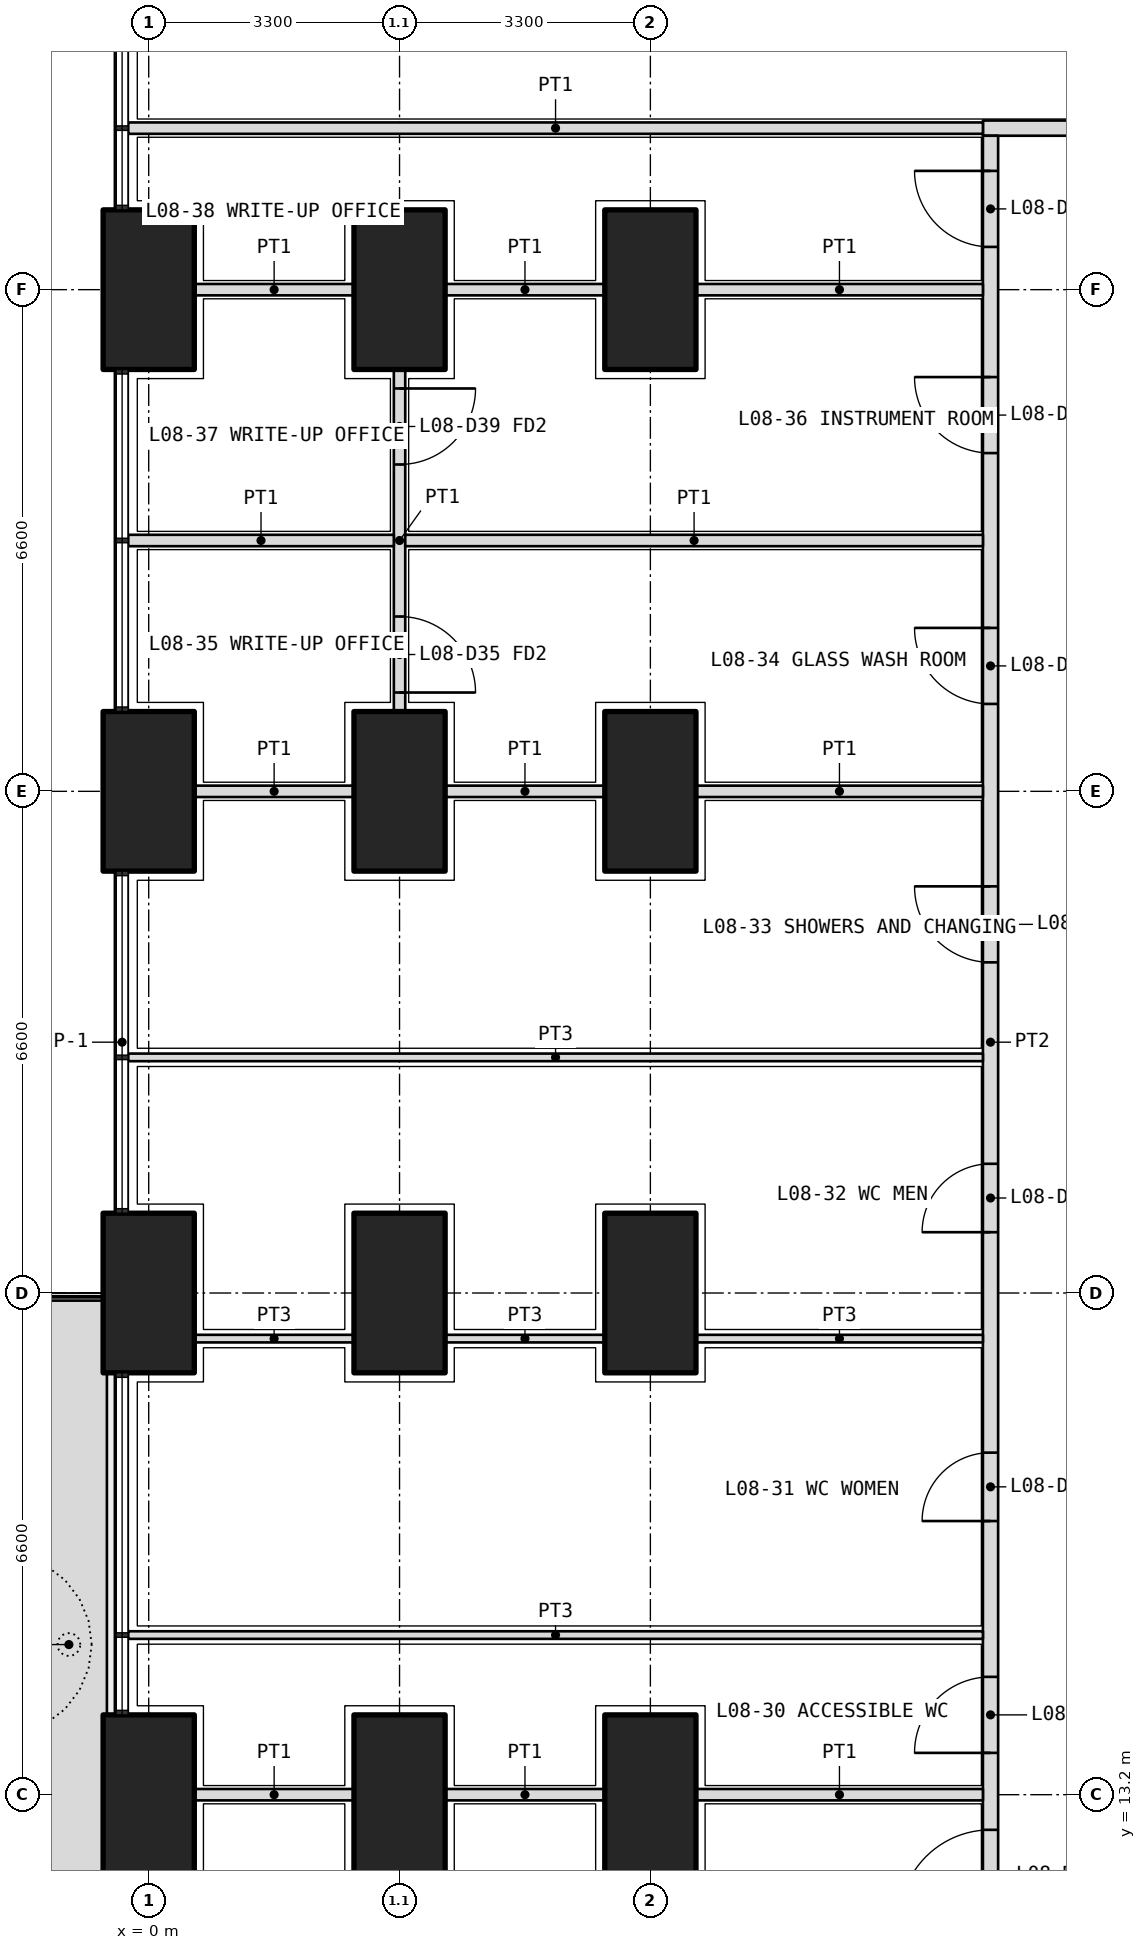
"""IFC4 building model, lengths in metres.
Left out: names, types, materials, properties, quantities, classifications, styles, units other than length and angle.
Written with IfcOpenShell. Run it as: python <this file> out.ifc"""

import sys

from ifc_helpers import new_model, si_unit, direction, frame, frame_2d, origin, origin_2d, place, context, subcontext, project, spatial, polyline, rectangle, outline, extrude, element, fill, save


model = new_model("IFC4")
c1 = context("Model", 3, precision=1e-05, world=origin(), true_north=direction((0.0, 1.0)))
c2 = subcontext(c1, "Body", "Model", "MODEL_VIEW")
j1 = project(units=[si_unit("LENGTHUNIT", "METRE"), si_unit("PLANEANGLEUNIT", "RADIAN")], contexts=[c1])
p1 = place(None, origin())
s1 = spatial("IfcSite", under=j1, at=p1, CompositionType="ELEMENT")
p2 = place(p1, origin())
s2 = spatial("IfcBuilding", under=s1, at=p2, CompositionType="ELEMENT")
p3 = place(p2, frame((0.0, 0.0, 38.1)))
s3 = spatial("IfcBuildingStorey", under=s2, at=p3, CompositionType="ELEMENT", Elevation=38.1)
for number, where, z_axis, x_axis in (
    (1, (0.0, 13.2, 0.0), (0.0, 0.0, 1.0), (0.0, 1.0, 0.0)),
    (2, (0.0, 19.8, 0.0), (0.0, 0.0, 1.0), (0.0, 1.0, 0.0)),
    (3, (0.0, 26.4, 0.0), (0.0, 0.0, 1.0), (0.0, 1.0, 0.0)),
    (4, (0.0, 33.0, 0.0), (0.0, 0.0, 1.0), (0.0, 1.0, 0.0)),
    (5, (3.3, 13.2, 0.0), (0.0, 0.0, 1.0), (0.0, 1.0, 0.0)),
    (6, (3.3, 19.8, 0.0), (0.0, 0.0, 1.0), (0.0, 1.0, 0.0)),
    (7, (3.3, 26.4, 0.0), (0.0, 0.0, 1.0), (0.0, 1.0, 0.0)),
    (8, (3.3, 33.0, 0.0), (0.0, 0.0, 1.0), (0.0, 1.0, 0.0)),
    (9, (6.6, 13.2, 0.0), (0.0, 0.0, 1.0), (0.0, 1.0, 0.0)),
    (10, (6.6, 19.8, 0.0), (0.0, 0.0, 1.0), (0.0, 1.0, 0.0)),
    (11, (6.6, 26.4, 0.0), (0.0, 0.0, 1.0), (0.0, 1.0, 0.0)),
    (12, (6.6, 33.0, 0.0), (0.0, 0.0, 1.0), (0.0, 1.0, 0.0)),
):
    element("IfcColumn", number, at=place(p3, frame(where, z_axis=z_axis, x_axis=x_axis)), inside=s3, PredefinedType="COLUMN", context=c2, shape_type="SweptSolid", body=[
        extrude(rectangle(XDim=2.1, YDim=1.2, at=origin_2d()), origin(), (0.0, 0.0, 1.0), 4.2),
    ])
p4 = place(p3, origin())
e13 = element("IfcWall", 13, at=p4, inside=s3, PredefinedType="USERDEFINED", context=c2, shape_type="SweptSolid", body=[
    extrude(outline(polyline([(-1.55, 10.65), (-0.55, 10.65), (-0.55, 19.7), (-1.55, 19.7), (-1.55, 10.65)]), holes=[polyline([(-1.4, 10.8), (-0.7, 10.8), (-0.7, 19.55), (-1.4, 19.55), (-1.4, 10.8)])]), origin(), (0.0, 0.0, 1.0), 1.05),
])
p5 = place(p3, frame((10.975, 35.125, 0.0), z_axis=(0.0, 0.0, 1.0), x_axis=(1.0, 0.0, 0.0)))
e14 = element("IfcWall", 14, at=p5, inside=s3, PredefinedType="PARTITIONING", context=c2, shape_type="SweptSolid", body=[
    extrude(rectangle(XDim=18.725, YDim=0.2, at=frame_2d((9.362, 0.0))), origin(), (0.0, 0.0, 1.0), 2.85),
])
p6 = place(p5, frame((5.512, 0.0, 0.0)))
e15 = element("IfcOpeningElement", 15, at=p6, cuts=e14, PredefinedType="OPENING", context=c2, shape_type="SweptSolid", body=[
    extrude(rectangle(XDim=1.2, YDim=2.1, at=frame_2d((0.6, 1.05))), frame((0.0, 0.11, 0.0), z_axis=(0.0, -1.0, 0.0), x_axis=(1.0, 0.0, 0.0)), (0.0, 0.0, 1.0), 0.22),
])
p7 = place(p5, frame((14.925, 0.0, 0.0)))
e16 = element("IfcOpeningElement", 16, at=p7, cuts=e14, PredefinedType="OPENING", context=c2, shape_type="SweptSolid", body=[
    extrude(rectangle(XDim=1.0, YDim=2.1, at=frame_2d((0.5, 1.05))), frame((0.0, 0.11, 0.0), z_axis=(0.0, -1.0, 0.0), x_axis=(1.0, 0.0, 0.0)), (0.0, 0.0, 1.0), 0.22),
])
p8 = place(p3, frame((11.075, 11.175, 0.0), z_axis=(0.0, 0.0, 1.0), x_axis=(0.0, 1.0, 0.0)))
e17 = element("IfcWall", 17, at=p8, inside=s3, PredefinedType="PARTITIONING", context=c2, shape_type="SweptSolid", body=[
    extrude(rectangle(XDim=23.85, YDim=0.2, at=frame_2d((11.925, 0.0))), origin(), (0.0, 0.0, 1.0), 2.85),
])
p9 = place(p8, frame((0.363, 0.0, 0.0)))
e18 = element("IfcOpeningElement", 18, at=p9, cuts=e17, PredefinedType="OPENING", context=c2, shape_type="SweptSolid", body=[
    extrude(rectangle(XDim=1.2, YDim=2.1, at=frame_2d((0.6, 1.05))), frame((0.0, 0.11, 0.0), z_axis=(0.0, -1.0, 0.0), x_axis=(1.0, 0.0, 0.0)), (0.0, 0.0, 1.0), 0.22),
])
p10 = place(p8, frame((2.575, 0.0, 0.0)))
e19 = element("IfcOpeningElement", 19, at=p10, cuts=e17, PredefinedType="OPENING", context=c2, shape_type="SweptSolid", body=[
    extrude(rectangle(XDim=1.0, YDim=2.1, at=frame_2d((0.5, 1.05))), frame((0.0, 0.11, 0.0), z_axis=(0.0, -1.0, 0.0), x_axis=(1.0, 0.0, 0.0)), (0.0, 0.0, 1.0), 0.22),
])
p11 = place(p8, frame((5.625, 0.0, 0.0)))
e20 = element("IfcOpeningElement", 20, at=p11, cuts=e17, PredefinedType="OPENING", context=c2, shape_type="SweptSolid", body=[
    extrude(rectangle(XDim=0.9, YDim=2.1, at=frame_2d((0.45, 1.05))), frame((0.0, 0.11, 0.0), z_axis=(0.0, -1.0, 0.0), x_axis=(1.0, 0.0, 0.0)), (0.0, 0.0, 1.0), 0.22),
])
p12 = place(p8, frame((9.425, 0.0, 0.0)))
e21 = element("IfcOpeningElement", 21, at=p12, cuts=e17, PredefinedType="OPENING", context=c2, shape_type="SweptSolid", body=[
    extrude(rectangle(XDim=0.9, YDim=2.1, at=frame_2d((0.45, 1.05))), frame((0.0, 0.11, 0.0), z_axis=(0.0, -1.0, 0.0), x_axis=(1.0, 0.0, 0.0)), (0.0, 0.0, 1.0), 0.22),
])
p13 = place(p8, frame((12.975, 0.0, 0.0)))
e22 = element("IfcOpeningElement", 22, at=p13, cuts=e17, PredefinedType="OPENING", context=c2, shape_type="SweptSolid", body=[
    extrude(rectangle(XDim=1.0, YDim=2.1, at=frame_2d((0.5, 1.05))), frame((0.0, 0.11, 0.0), z_axis=(0.0, -1.0, 0.0), x_axis=(1.0, 0.0, 0.0)), (0.0, 0.0, 1.0), 0.22),
])
p14 = place(p8, frame((16.375, 0.0, 0.0)))
e23 = element("IfcOpeningElement", 23, at=p14, cuts=e17, PredefinedType="OPENING", context=c2, shape_type="SweptSolid", body=[
    extrude(rectangle(XDim=1.0, YDim=2.1, at=frame_2d((0.5, 1.05))), frame((0.0, 0.11, 0.0), z_axis=(0.0, -1.0, 0.0), x_axis=(1.0, 0.0, 0.0)), (0.0, 0.0, 1.0), 0.22),
])
p15 = place(p8, frame((19.675, 0.0, 0.0)))
e24 = element("IfcOpeningElement", 24, at=p15, cuts=e17, PredefinedType="OPENING", context=c2, shape_type="SweptSolid", body=[
    extrude(rectangle(XDim=1.0, YDim=2.1, at=frame_2d((0.5, 1.05))), frame((0.0, 0.11, 0.0), z_axis=(0.0, -1.0, 0.0), x_axis=(1.0, 0.0, 0.0)), (0.0, 0.0, 1.0), 0.22),
])
p16 = place(p8, frame((22.387, 0.0, 0.0)))
e25 = element("IfcOpeningElement", 25, at=p16, cuts=e17, PredefinedType="OPENING", context=c2, shape_type="SweptSolid", body=[
    extrude(rectangle(XDim=1.0, YDim=2.1, at=frame_2d((0.5, 1.05))), frame((0.0, 0.11, 0.0), z_axis=(0.0, -1.0, 0.0), x_axis=(1.0, 0.0, 0.0)), (0.0, 0.0, 1.0), 0.22),
])
p17 = place(p3, frame((-0.27, 35.125, 0.0), z_axis=(0.0, 0.0, 1.0), x_axis=(1.0, 0.0, 0.0)))
e26 = element("IfcWall", 26, at=p17, inside=s3, PredefinedType="PARTITIONING", context=c2, shape_type="SweptSolid", body=[
    extrude(rectangle(XDim=11.245, YDim=0.15, at=frame_2d((5.623, 0.0))), origin(), (0.0, 0.0, 1.0), 2.7),
])
p18 = place(p3, frame((3.3, 31.95, 0.0), z_axis=(0.0, 0.0, 1.0), x_axis=(0.0, -1.0, 0.0)))
e27 = element("IfcWall", 27, at=p18, inside=s3, PredefinedType="PARTITIONING", context=c2, shape_type="SweptSolid", body=[
    extrude(rectangle(XDim=4.5, YDim=0.15, at=frame_2d((2.25, 0.0))), origin(), (0.0, 0.0, 1.0), 3.9),
])
p19 = place(p18, frame((3.25, 0.0, 0.0)))
e28 = element("IfcOpeningElement", 28, at=p19, cuts=e27, PredefinedType="OPENING", context=c2, shape_type="SweptSolid", body=[
    extrude(rectangle(XDim=1.0, YDim=2.1, at=frame_2d((0.5, 1.05))), frame((0.0, 0.085, 0.0), z_axis=(0.0, -1.0, 0.0), x_axis=(1.0, 0.0, 0.0)), (0.0, 0.0, 1.0), 0.17),
])
p20 = place(p18, frame((0.25, 0.0, 0.0)))
e29 = element("IfcOpeningElement", 29, at=p20, cuts=e27, PredefinedType="OPENING", context=c2, shape_type="SweptSolid", body=[
    extrude(rectangle(XDim=1.0, YDim=2.1, at=frame_2d((0.5, 1.05))), frame((0.0, 0.085, 0.0), z_axis=(0.0, -1.0, 0.0), x_axis=(1.0, 0.0, 0.0)), (0.0, 0.0, 1.0), 0.17),
])
p21 = place(p3, frame((-0.27, 15.3, 0.0), z_axis=(0.0, 0.0, 1.0), x_axis=(1.0, 0.0, 0.0)))
e30 = element("IfcWall", 30, at=p21, inside=s3, PredefinedType="PARTITIONING", context=c2, shape_type="SweptSolid", body=[
    extrude(rectangle(XDim=11.245, YDim=0.1, at=frame_2d((5.623, 0.0))), origin(), (0.0, 0.0, 1.0), 2.7),
])
p22 = place(p3, frame((0.6, 19.2, 0.0), z_axis=(0.0, 0.0, 1.0), x_axis=(1.0, 0.0, 0.0)))
e31 = element("IfcWall", 31, at=p22, inside=s3, PredefinedType="PARTITIONING", context=c2, shape_type="SweptSolid", body=[
    extrude(rectangle(XDim=2.1, YDim=0.1, at=frame_2d((1.05, 0.0))), origin(), (0.0, 0.0, 1.0), 2.85),
])
p23 = place(p3, frame((3.9, 19.2, 0.0), z_axis=(0.0, 0.0, 1.0), x_axis=(1.0, 0.0, 0.0)))
e32 = element("IfcWall", 32, at=p23, inside=s3, PredefinedType="PARTITIONING", context=c2, shape_type="SweptSolid", body=[
    extrude(rectangle(XDim=2.1, YDim=0.1, at=frame_2d((1.05, 0.0))), origin(), (0.0, 0.0, 1.0), 2.85),
])
p24 = place(p3, frame((7.2, 19.2, 0.0), z_axis=(0.0, 0.0, 1.0), x_axis=(1.0, 0.0, 0.0)))
e33 = element("IfcWall", 33, at=p24, inside=s3, PredefinedType="PARTITIONING", context=c2, shape_type="SweptSolid", body=[
    extrude(rectangle(XDim=3.775, YDim=0.1, at=frame_2d((1.888, 0.0))), origin(), (0.0, 0.0, 1.0), 2.85),
])
p25 = place(p3, frame((-0.27, 22.9, 0.0), z_axis=(0.0, 0.0, 1.0), x_axis=(1.0, 0.0, 0.0)))
e34 = element("IfcWall", 34, at=p25, inside=s3, PredefinedType="PARTITIONING", context=c2, shape_type="SweptSolid", body=[
    extrude(rectangle(XDim=11.245, YDim=0.1, at=frame_2d((5.623, 0.0))), origin(), (0.0, 0.0, 1.0), 2.7),
])
p26 = place(p3, frame((0.6, 13.2, 0.0), z_axis=(0.0, 0.0, 1.0), x_axis=(1.0, 0.0, 0.0)))
e35 = element("IfcWall", 35, at=p26, inside=s3, PredefinedType="PARTITIONING", context=c2, shape_type="SweptSolid", body=[
    extrude(rectangle(XDim=2.1, YDim=0.15, at=frame_2d((1.05, 0.0))), origin(), (0.0, 0.0, 1.0), 2.85),
])
p27 = place(p3, frame((3.9, 13.2, 0.0), z_axis=(0.0, 0.0, 1.0), x_axis=(1.0, 0.0, 0.0)))
e36 = element("IfcWall", 36, at=p27, inside=s3, PredefinedType="PARTITIONING", context=c2, shape_type="SweptSolid", body=[
    extrude(rectangle(XDim=2.1, YDim=0.15, at=frame_2d((1.05, 0.0))), origin(), (0.0, 0.0, 1.0), 2.85),
])
p28 = place(p3, frame((7.2, 13.2, 0.0), z_axis=(0.0, 0.0, 1.0), x_axis=(1.0, 0.0, 0.0)))
e37 = element("IfcWall", 37, at=p28, inside=s3, PredefinedType="PARTITIONING", context=c2, shape_type="SweptSolid", body=[
    extrude(rectangle(XDim=3.775, YDim=0.15, at=frame_2d((1.888, 0.0))), origin(), (0.0, 0.0, 1.0), 2.85),
])
p29 = place(p3, frame((0.6, 26.4, 0.0), z_axis=(0.0, 0.0, 1.0), x_axis=(1.0, 0.0, 0.0)))
e38 = element("IfcWall", 38, at=p29, inside=s3, PredefinedType="PARTITIONING", context=c2, shape_type="SweptSolid", body=[
    extrude(rectangle(XDim=2.1, YDim=0.15, at=frame_2d((1.05, 0.0))), origin(), (0.0, 0.0, 1.0), 2.85),
])
p30 = place(p3, frame((3.9, 26.4, 0.0), z_axis=(0.0, 0.0, 1.0), x_axis=(1.0, 0.0, 0.0)))
e39 = element("IfcWall", 39, at=p30, inside=s3, PredefinedType="PARTITIONING", context=c2, shape_type="SweptSolid", body=[
    extrude(rectangle(XDim=2.1, YDim=0.15, at=frame_2d((1.05, 0.0))), origin(), (0.0, 0.0, 1.0), 2.85),
])
p31 = place(p3, frame((7.2, 26.4, 0.0), z_axis=(0.0, 0.0, 1.0), x_axis=(1.0, 0.0, 0.0)))
e40 = element("IfcWall", 40, at=p31, inside=s3, PredefinedType="PARTITIONING", context=c2, shape_type="SweptSolid", body=[
    extrude(rectangle(XDim=3.775, YDim=0.15, at=frame_2d((1.888, 0.0))), origin(), (0.0, 0.0, 1.0), 2.85),
])
p32 = place(p3, frame((-0.27, 29.7, 0.0), z_axis=(0.0, 0.0, 1.0), x_axis=(1.0, 0.0, 0.0)))
e41 = element("IfcWall", 41, at=p32, inside=s3, PredefinedType="PARTITIONING", context=c2, shape_type="SweptSolid", body=[
    extrude(rectangle(XDim=3.495, YDim=0.15, at=frame_2d((1.748, 0.0))), origin(), (0.0, 0.0, 1.0), 2.7),
])
p33 = place(p3, frame((3.375, 29.7, 0.0), z_axis=(0.0, 0.0, 1.0), x_axis=(1.0, 0.0, 0.0)))
e42 = element("IfcWall", 42, at=p33, inside=s3, PredefinedType="PARTITIONING", context=c2, shape_type="SweptSolid", body=[
    extrude(rectangle(XDim=7.6, YDim=0.15, at=frame_2d((3.8, 0.0))), origin(), (0.0, 0.0, 1.0), 3.9),
])
p34 = place(p3, frame((0.6, 33.0, 0.0), z_axis=(0.0, 0.0, 1.0), x_axis=(1.0, 0.0, 0.0)))
e43 = element("IfcWall", 43, at=p34, inside=s3, PredefinedType="PARTITIONING", context=c2, shape_type="SweptSolid", body=[
    extrude(rectangle(XDim=2.1, YDim=0.15, at=frame_2d((1.05, 0.0))), origin(), (0.0, 0.0, 1.0), 2.85),
])
p35 = place(p3, frame((3.9, 33.0, 0.0), z_axis=(0.0, 0.0, 1.0), x_axis=(1.0, 0.0, 0.0)))
e44 = element("IfcWall", 44, at=p35, inside=s3, PredefinedType="PARTITIONING", context=c2, shape_type="SweptSolid", body=[
    extrude(rectangle(XDim=2.1, YDim=0.15, at=frame_2d((1.05, 0.0))), origin(), (0.0, 0.0, 1.0), 2.85),
])
p36 = place(p3, frame((7.2, 33.0, 0.0), z_axis=(0.0, 0.0, 1.0), x_axis=(1.0, 0.0, 0.0)))
e45 = element("IfcWall", 45, at=p36, inside=s3, PredefinedType="PARTITIONING", context=c2, shape_type="SweptSolid", body=[
    extrude(rectangle(XDim=3.775, YDim=0.15, at=frame_2d((1.888, 0.0))), origin(), (0.0, 0.0, 1.0), 2.85),
])
p37 = place(p9, origin())
e46 = element("IfcDoor", 46, at=p37, inside=s3, OperationType="DOUBLE_DOOR_SINGLE_SWING", PredefinedType="DOOR", context=c2, shape_type="SweptSolid", body=[
    extrude(rectangle(XDim=1.2, YDim=2.1, at=frame_2d((0.6, 1.05))), frame((0.0, 0.025, 0.0), z_axis=(0.0, -1.0, 0.0), x_axis=(1.0, 0.0, 0.0)), (0.0, 0.0, 1.0), 0.05),
])
fill(e18, e46)
p38 = place(p10, origin())
e47 = element("IfcDoor", 47, at=p38, inside=s3, OperationType="SINGLE_SWING_LEFT", PredefinedType="DOOR", context=c2, shape_type="SweptSolid", body=[
    extrude(rectangle(XDim=1.0, YDim=2.1, at=frame_2d((0.5, 1.05))), frame((0.0, 0.025, 0.0), z_axis=(0.0, -1.0, 0.0), x_axis=(1.0, 0.0, 0.0)), (0.0, 0.0, 1.0), 0.05),
])
fill(e19, e47)
p39 = place(p11, origin())
e48 = element("IfcDoor", 48, at=p39, inside=s3, OperationType="SINGLE_SWING_LEFT", PredefinedType="DOOR", context=c2, shape_type="SweptSolid", body=[
    extrude(rectangle(XDim=0.9, YDim=2.1, at=frame_2d((0.45, 1.05))), frame((0.0, 0.025, 0.0), z_axis=(0.0, -1.0, 0.0), x_axis=(1.0, 0.0, 0.0)), (0.0, 0.0, 1.0), 0.05),
])
fill(e20, e48)
p40 = place(p12, origin())
e49 = element("IfcDoor", 49, at=p40, inside=s3, OperationType="SINGLE_SWING_LEFT", PredefinedType="DOOR", context=c2, shape_type="SweptSolid", body=[
    extrude(rectangle(XDim=0.9, YDim=2.1, at=frame_2d((0.45, 1.05))), frame((0.0, 0.025, 0.0), z_axis=(0.0, -1.0, 0.0), x_axis=(1.0, 0.0, 0.0)), (0.0, 0.0, 1.0), 0.05),
])
fill(e21, e49)
p41 = place(p13, origin())
e50 = element("IfcDoor", 50, at=p41, inside=s3, OperationType="SINGLE_SWING_RIGHT", PredefinedType="DOOR", context=c2, shape_type="SweptSolid", body=[
    extrude(rectangle(XDim=1.0, YDim=2.1, at=frame_2d((0.5, 1.05))), frame((0.0, 0.025, 0.0), z_axis=(0.0, -1.0, 0.0), x_axis=(1.0, 0.0, 0.0)), (0.0, 0.0, 1.0), 0.05),
])
fill(e22, e50)
p42 = place(p14, origin())
e51 = element("IfcDoor", 51, at=p42, inside=s3, OperationType="SINGLE_SWING_RIGHT", PredefinedType="DOOR", context=c2, shape_type="SweptSolid", body=[
    extrude(rectangle(XDim=1.0, YDim=2.1, at=frame_2d((0.5, 1.05))), frame((0.0, 0.025, 0.0), z_axis=(0.0, -1.0, 0.0), x_axis=(1.0, 0.0, 0.0)), (0.0, 0.0, 1.0), 0.05),
])
fill(e23, e51)
p43 = place(p19, origin())
e52 = element("IfcDoor", 52, at=p43, inside=s3, OperationType="SINGLE_SWING_RIGHT", PredefinedType="DOOR", context=c2, shape_type="SweptSolid", body=[
    extrude(rectangle(XDim=1.0, YDim=2.1, at=frame_2d((0.5, 1.05))), frame((0.0, 0.025, 0.0), z_axis=(0.0, -1.0, 0.0), x_axis=(1.0, 0.0, 0.0)), (0.0, 0.0, 1.0), 0.05),
])
fill(e28, e52)
p44 = place(p15, origin())
e53 = element("IfcDoor", 53, at=p44, inside=s3, OperationType="SINGLE_SWING_RIGHT", PredefinedType="DOOR", context=c2, shape_type="SweptSolid", body=[
    extrude(rectangle(XDim=1.0, YDim=2.1, at=frame_2d((0.5, 1.05))), frame((0.0, 0.025, 0.0), z_axis=(0.0, -1.0, 0.0), x_axis=(1.0, 0.0, 0.0)), (0.0, 0.0, 1.0), 0.05),
])
fill(e24, e53)
p45 = place(p20, origin())
e54 = element("IfcDoor", 54, at=p45, inside=s3, OperationType="SINGLE_SWING_LEFT", PredefinedType="DOOR", context=c2, shape_type="SweptSolid", body=[
    extrude(rectangle(XDim=1.0, YDim=2.1, at=frame_2d((0.5, 1.05))), frame((0.0, 0.025, 0.0), z_axis=(0.0, -1.0, 0.0), x_axis=(1.0, 0.0, 0.0)), (0.0, 0.0, 1.0), 0.05),
])
fill(e29, e54)
p46 = place(p16, origin())
e55 = element("IfcDoor", 55, at=p46, inside=s3, OperationType="SINGLE_SWING_RIGHT", PredefinedType="DOOR", context=c2, shape_type="SweptSolid", body=[
    extrude(rectangle(XDim=1.0, YDim=2.1, at=frame_2d((0.5, 1.05))), frame((0.0, 0.025, 0.0), z_axis=(0.0, -1.0, 0.0), x_axis=(1.0, 0.0, 0.0)), (0.0, 0.0, 1.0), 0.05),
])
fill(e25, e55)
save(model, sys.argv[1])
